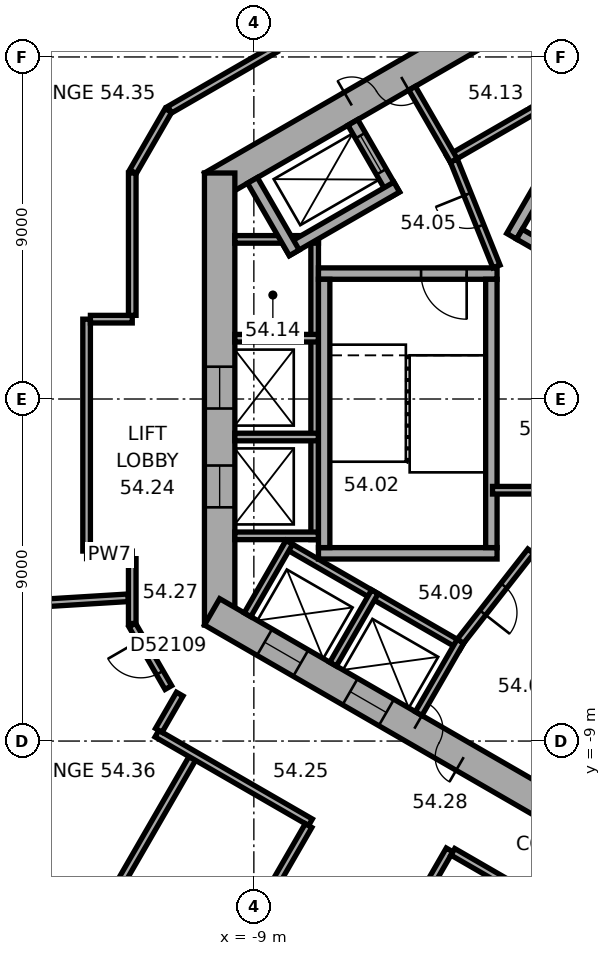
"""IFC4 building model, lengths in metres.
Left out: names, types, materials, properties, quantities, classifications, styles, units other than length and angle.
Written with IfcOpenShell. Run it as: python <this file> out.ifc"""

import sys

from ifc_helpers import new_model, si_unit, direction, frame, frame_2d, origin, place, context, subcontext, project, spatial, rectangle, extrude, element, fill, save


model = new_model("IFC4")
c1 = context("Model", 3, precision=1e-05, world=origin(), true_north=direction((0.0, 1.0)))
c2 = subcontext(c1, "Body", "Model", "MODEL_VIEW")
j1 = project(units=[si_unit("LENGTHUNIT", "METRE"), si_unit("PLANEANGLEUNIT", "RADIAN")], contexts=[c1])
p1 = place(None, origin())
s1 = spatial("IfcSite", under=j1, at=p1, CompositionType="ELEMENT")
p2 = place(p1, origin())
s2 = spatial("IfcBuilding", under=s1, at=p2, CompositionType="ELEMENT")
p3 = place(p2, frame((0.0, 0.0, 221.7)))
s3 = spatial("IfcBuildingStorey", under=s2, at=p3, CompositionType="ELEMENT", Elevation=221.7)
p4 = place(p3, frame((0.2, 11.547, 0.0), z_axis=(0.0, 0.0, 1.0), x_axis=(-0.866023897231, -0.500002609418, 0.0)))
e1 = element("IfcWall", 1, at=p4, inside=s3, PredefinedType="SHEAR", context=c2, shape_type="SweptSolid", body=[
    extrude(rectangle(XDim=11.894, YDim=0.8, at=frame_2d((5.947, 0.0))), origin(), (0.0, 0.0, 1.0), 3.7),
])
p5 = place(p4, frame((6.147, 0.0, 0.0)))
e2 = element("IfcOpeningElement", 2, at=p5, cuts=e1, PredefinedType="OPENING", context=c2, shape_type="SweptSolid", body=[
    extrude(rectangle(XDim=1.5, YDim=2.1, at=frame_2d((0.75, 1.05))), frame((0.0, 0.41, 0.0), z_axis=(0.0, -1.0, 0.0), x_axis=(1.0, 0.0, 0.0)), (0.0, 0.0, 1.0), 0.82),
])
p6 = place(p4, frame((2.997, 0.0, 0.0)))
e3 = element("IfcOpeningElement", 3, at=p6, cuts=e1, PredefinedType="OPENING", context=c2, shape_type="SweptSolid", body=[
    extrude(rectangle(XDim=0.9, YDim=2.1, at=frame_2d((0.45, 1.05))), frame((0.0, 0.41, 0.0), z_axis=(0.0, -1.0, 0.0), x_axis=(1.0, 0.0, 0.0)), (0.0, 0.0, 1.0), 0.82),
])
p7 = place(p3, frame((-9.9, 5.947, 0.0), z_axis=(0.0, 0.0, 1.0), x_axis=(0.0, -1.0, 0.0)))
e4 = element("IfcWall", 4, at=p7, inside=s3, PredefinedType="SHEAR", context=c2, shape_type="SweptSolid", body=[
    extrude(rectangle(XDim=11.894, YDim=0.8, at=frame_2d((5.947, 0.0))), origin(), (0.0, 0.0, 1.0), 3.7),
])
p8 = place(p7, frame((5.097, 0.0, 0.0)))
e5 = element("IfcOpeningElement", 5, at=p8, cuts=e4, PredefinedType="OPENING", context=c2, shape_type="SweptSolid", body=[
    extrude(rectangle(XDim=1.1, YDim=2.1, at=frame_2d((0.55, 1.05))), frame((0.0, 0.41, 0.0), z_axis=(0.0, -1.0, 0.0), x_axis=(1.0, 0.0, 0.0)), (0.0, 0.0, 1.0), 0.82),
])
p9 = place(p7, frame((7.697, 0.0, 0.0)))
e6 = element("IfcOpeningElement", 6, at=p9, cuts=e4, PredefinedType="OPENING", context=c2, shape_type="SweptSolid", body=[
    extrude(rectangle(XDim=1.1, YDim=2.1, at=frame_2d((0.55, 1.05))), frame((0.0, 0.41, 0.0), z_axis=(0.0, -1.0, 0.0), x_axis=(1.0, 0.0, 0.0)), (0.0, 0.0, 1.0), 0.82),
])
p10 = place(p3, frame((-10.1, -5.6, 0.0), z_axis=(0.0, 0.0, 1.0), x_axis=(0.866023897231, -0.500002609418, 0.0)))
e7 = element("IfcWall", 7, at=p10, inside=s3, PredefinedType="SHEAR", context=c2, shape_type="SweptSolid", body=[
    extrude(rectangle(XDim=11.894, YDim=0.8, at=frame_2d((5.947, 0.0))), origin(), (0.0, 0.0, 1.0), 3.7),
])
p11 = place(p10, frame((6.147, 0.0, 0.0)))
e8 = element("IfcOpeningElement", 8, at=p11, cuts=e7, PredefinedType="OPENING", context=c2, shape_type="SweptSolid", body=[
    extrude(rectangle(XDim=1.5, YDim=2.1, at=frame_2d((0.75, 1.05))), frame((0.0, 0.41, 0.0), z_axis=(0.0, -1.0, 0.0), x_axis=(1.0, 0.0, 0.0)), (0.0, 0.0, 1.0), 0.82),
])
p12 = place(p10, frame((1.597, 0.0, 0.0)))
e9 = element("IfcOpeningElement", 9, at=p12, cuts=e7, PredefinedType="OPENING", context=c2, shape_type="SweptSolid", body=[
    extrude(rectangle(XDim=1.1, YDim=2.1, at=frame_2d((0.55, 1.05))), frame((0.0, 0.41, 0.0), z_axis=(0.0, -1.0, 0.0), x_axis=(1.0, 0.0, 0.0)), (0.0, 0.0, 1.0), 0.82),
])
p13 = place(p10, frame((4.197, 0.0, 0.0)))
e10 = element("IfcOpeningElement", 10, at=p13, cuts=e7, PredefinedType="OPENING", context=c2, shape_type="SweptSolid", body=[
    extrude(rectangle(XDim=1.1, YDim=2.1, at=frame_2d((0.55, 1.05))), frame((0.0, 0.41, 0.0), z_axis=(0.0, -1.0, 0.0), x_axis=(1.0, 0.0, 0.0)), (0.0, 0.0, 1.0), 0.82),
])
p14 = place(p3, frame((0.803, 9.009, 0.0), z_axis=(0.0, 0.0, 1.0), x_axis=(-0.866028230842, -0.499995103361, 0.0)))
e11 = element("IfcWall", 11, at=p14, inside=s3, PredefinedType="PARTITIONING", context=c2, shape_type="SweptSolid", body=[
    extrude(rectangle(XDim=5.4, YDim=0.2, at=frame_2d((2.7, 0.0))), origin(), (0.0, 0.0, 1.0), 3.42),
])
p15 = place(p3, frame((-3.737, 6.272, 0.0), z_axis=(0.0, 0.0, 1.0), x_axis=(-0.50002983664, 0.866008176907, 0.0)))
e12 = element("IfcWall", 12, at=p15, inside=s3, PredefinedType="PARTITIONING", context=c2, shape_type="SweptSolid", body=[
    extrude(rectangle(XDim=2.2, YDim=0.2, at=frame_2d((1.1, 0.0))), origin(), (0.0, 0.0, 1.0), 3.42),
])
p16 = place(p3, frame((-7.4, 4.3, 0.0), z_axis=(0.0, 0.0, 1.0), x_axis=(0.0, -1.0, 0.0)))
e13 = element("IfcWall", 13, at=p16, inside=s3, PredefinedType="PARTITIONING", context=c2, shape_type="SweptSolid", body=[
    extrude(rectangle(XDim=8.0, YDim=0.2, at=frame_2d((4.0, 0.0))), origin(), (0.0, 0.0, 1.0), 3.42),
])
for number, where, z_axis, x_axis in (
    (14, (-7.3, 4.2, 0.0), (0.0, 0.0, 1.0), (-1.0, 0.0, 0.0)),
    (15, (-7.3, 1.6, 0.0), (0.0, 0.0, 1.0), (-1.0, 0.0, 0.0)),
    (16, (-7.3, -1.0, 0.0), (0.0, 0.0, 1.0), (-1.0, 0.0, 0.0)),
    (17, (-7.3, -3.6, 0.0), (0.0, 0.0, 1.0), (-1.0, 0.0, 0.0)),
):
    element("IfcWall", number, at=place(p3, frame(where, z_axis=z_axis, x_axis=x_axis)), inside=s3, PredefinedType="PARTITIONING", context=c2, shape_type="SweptSolid", body=[
        extrude(rectangle(XDim=2.2, YDim=0.2, at=frame_2d((1.1, 0.0))), origin(), (0.0, 0.0, 1.0), 3.42),
    ])
p17 = place(p3, frame((-8.203, -3.809, 0.0), z_axis=(0.0, 0.0, 1.0), x_axis=(0.866028230842, -0.499995103361, 0.0)))
e18 = element("IfcWall", 18, at=p17, inside=s3, PredefinedType="PARTITIONING", context=c2, shape_type="SweptSolid", body=[
    extrude(rectangle(XDim=5.4, YDim=0.2, at=frame_2d((2.7, 0.0))), origin(), (0.0, 0.0, 1.0), 3.42),
])
for number, where, z_axis, x_axis in (
    (19, (-8.067, -3.772, 0.0), (0.0, 0.0, 1.0), (-0.5, -0.866, 0.0)),
    (20, (-5.815, -5.072, 0.0), (0.0, 0.0, 1.0), (-0.5, -0.866, 0.0)),
):
    element("IfcWall", number, at=place(p3, frame(where, z_axis=z_axis, x_axis=x_axis)), inside=s3, PredefinedType="PARTITIONING", context=c2, shape_type="SweptSolid", body=[
        extrude(rectangle(XDim=2.2, YDim=0.2, at=frame_2d((1.1, 0.0))), origin(), (0.0, 0.0, 1.0), 3.42),
    ])
p18 = place(p3, frame((-3.563, -6.372, 0.0), z_axis=(0.0, 0.0, 1.0), x_axis=(-0.499994660107, -0.866028486751, 0.0)))
e21 = element("IfcWall", 21, at=p18, inside=s3, PredefinedType="PARTITIONING", context=c2, shape_type="SweptSolid", body=[
    extrude(rectangle(XDim=2.2, YDim=0.2, at=frame_2d((1.1, 0.0))), origin(), (0.0, 0.0, 1.0), 3.42),
])
p19 = place(p3, frame((-2.216, 4.282, 0.0), z_axis=(0.0, 0.0, 1.0), x_axis=(0.499977259774, 0.866038532462, 0.0)))
e22 = element("IfcWall", 22, at=p19, inside=s3, PredefinedType="SHEAR", context=c2, shape_type="SweptSolid", body=[
    extrude(rectangle(XDim=4.7, YDim=0.3, at=frame_2d((2.35, 0.0))), origin(), (0.0, 0.0, 1.0), 3.42),
])
p20 = place(p3, frame((4.103, 0.807, 0.0), z_axis=(0.0, 0.0, 1.0), x_axis=(-0.866027801685, 0.499995846692, 0.0)))
e23 = element("IfcWall", 23, at=p20, inside=s3, PredefinedType="SHEAR", context=c2, shape_type="SweptSolid", body=[
    extrude(rectangle(XDim=7.06, YDim=0.3, at=frame_2d((3.53, 0.0))), origin(), (0.0, 0.0, 1.0), 3.42),
])
p21 = place(p3, frame((-2.6, 3.3, 0.0), z_axis=(0.0, 0.0, 1.0), x_axis=(-1.0, 0.0, 0.0)))
e24 = element("IfcWall", 24, at=p21, inside=s3, PredefinedType="SHEAR", context=c2, shape_type="SweptSolid", body=[
    extrude(rectangle(XDim=4.7, YDim=0.3, at=frame_2d((2.35, 0.0))), origin(), (0.0, 0.0, 1.0), 3.42),
])
p22 = place(p21, frame((0.8, 0.0, 0.0)))
e25 = element("IfcOpeningElement", 25, at=p22, cuts=e24, PredefinedType="OPENING", context=c2, shape_type="SweptSolid", body=[
    extrude(rectangle(XDim=1.2, YDim=2.1, at=frame_2d((0.6, 1.05))), frame((0.0, 0.16, 0.0), z_axis=(0.0, -1.0, 0.0), x_axis=(1.0, 0.0, 0.0)), (0.0, 0.0, 1.0), 0.32),
])
p23 = place(p3, frame((-2.6, -4.06, 0.0), z_axis=(0.0, 0.0, 1.0), x_axis=(-1.0, 0.0, 0.0)))
e26 = element("IfcWall", 26, at=p23, inside=s3, PredefinedType="SHEAR", context=c2, shape_type="SweptSolid", body=[
    extrude(rectangle(XDim=4.7, YDim=0.3, at=frame_2d((2.35, 0.0))), origin(), (0.0, 0.0, 1.0), 3.42),
])
for number, where, z_axis, x_axis in (
    (27, (-2.75, 3.15, 0.0), (0.0, 0.0, 1.0), (0.0, -1.0, 0.0)),
    (28, (-7.15, 3.15, 0.0), (0.0, 0.0, 1.0), (0.0, -1.0, 0.0)),
):
    element("IfcWall", number, at=place(p3, frame(where, z_axis=z_axis, x_axis=x_axis)), inside=s3, PredefinedType="SHEAR", context=c2, shape_type="SweptSolid", body=[
        extrude(rectangle(XDim=7.06, YDim=0.3, at=frame_2d((3.53, 0.0))), origin(), (0.0, 0.0, 1.0), 3.42),
    ])
p24 = place(p3, frame((-5.295, 5.372, 0.0), z_axis=(0.0, 0.0, 1.0), x_axis=(-0.500077893725, 0.86598042715, 0.0)))
e29 = element("IfcWall", 29, at=p24, inside=s3, PredefinedType="SHEAR", context=c2, shape_type="SweptSolid", body=[
    extrude(rectangle(XDim=2.2, YDim=0.3, at=frame_2d((1.1, 0.0))), origin(), (0.0, 0.0, 1.0), 3.42),
])
p25 = place(p24, frame((0.7, 0.0, 0.0)))
e30 = element("IfcOpeningElement", 30, at=p25, cuts=e29, PredefinedType="OPENING", context=c2, shape_type="SweptSolid", body=[
    extrude(rectangle(XDim=1.1, YDim=2.1, at=frame_2d((0.55, 1.05))), frame((0.0, 0.16, 0.0), z_axis=(0.0, -1.0, 0.0), x_axis=(1.0, 0.0, 0.0)), (0.0, 0.0, 1.0), 0.32),
])
p26 = place(p3, frame((-5.24, 5.577, 0.0), z_axis=(0.0, 0.0, 1.0), x_axis=(-0.866014461049, -0.500018952895, 0.0)))
e31 = element("IfcWall", 31, at=p26, inside=s3, PredefinedType="SHEAR", context=c2, shape_type="SweptSolid", body=[
    extrude(rectangle(XDim=3.35, YDim=0.3, at=frame_2d((1.675, 0.0))), origin(), (0.0, 0.0, 1.0), 3.42),
])
p27 = place(p3, frame((-7.937, 3.847, 0.0), z_axis=(0.0, 0.0, 1.0), x_axis=(-0.50002983664, 0.866008176907, 0.0)))
e32 = element("IfcWall", 32, at=p27, inside=s3, PredefinedType="SHEAR", context=c2, shape_type="SweptSolid", body=[
    extrude(rectangle(XDim=2.2, YDim=0.3, at=frame_2d((1.1, 0.0))), origin(), (0.0, 0.0, 1.0), 3.42),
])
p28 = place(p3, frame((-2.615, 3.487, 0.0), z_axis=(0.0, 0.0, 1.0), x_axis=(-0.373576831041, 0.92759924068, 0.0)))
e33 = element("IfcWall", 33, at=p28, inside=s3, PredefinedType="PARTITIONING", context=c2, shape_type="SweptSolid", body=[
    extrude(rectangle(XDim=3.002, YDim=0.2, at=frame_2d((1.501, 0.0))), origin(), (0.0, 0.0, 1.0), 3.42),
])
p29 = place(p28, frame((1.15, 0.0, 0.0)))
e34 = element("IfcOpeningElement", 34, at=p29, cuts=e33, PredefinedType="OPENING", context=c2, shape_type="SweptSolid", body=[
    extrude(rectangle(XDim=0.9, YDim=2.1, at=frame_2d((0.45, 1.05))), frame((0.0, 0.11, 0.0), z_axis=(0.0, -1.0, 0.0), x_axis=(1.0, 0.0, 0.0)), (0.0, 0.0, 1.0), 0.22),
])
p30 = place(p3, frame((-1.712, -4.008, 0.0), z_axis=(0.0, 0.0, 1.0), x_axis=(-0.616549420702, -0.787316208287, 0.0)))
e35 = element("IfcWall", 35, at=p30, inside=s3, PredefinedType="PARTITIONING", context=c2, shape_type="SweptSolid", body=[
    extrude(rectangle(XDim=3.002, YDim=0.2, at=frame_2d((1.501, 0.0))), origin(), (0.0, 0.0, 1.0), 3.42),
])
p31 = place(p30, frame((1.15, 0.0, 0.0)))
e36 = element("IfcOpeningElement", 36, at=p31, cuts=e35, PredefinedType="OPENING", context=c2, shape_type="SweptSolid", body=[
    extrude(rectangle(XDim=0.9, YDim=2.1, at=frame_2d((0.45, 1.05))), frame((0.0, 0.11, 0.0), z_axis=(0.0, -1.0, 0.0), x_axis=(1.0, 0.0, 0.0)), (0.0, 0.0, 1.0), 0.22),
])
p32 = place(p3, frame((-2.72, -2.4, 0.0), z_axis=(0.0, 0.0, 1.0), x_axis=(1.0, 0.0, 0.0)))
e37 = element("IfcWall", 37, at=p32, inside=s3, PredefinedType="PARTITIONING", context=c2, shape_type="SweptSolid", body=[
    extrude(rectangle(XDim=3.883, YDim=0.2, at=frame_2d((1.941, 0.0))), origin(), (0.0, 0.0, 1.0), 3.42),
])
p33 = place(p3, frame((-19.241, -5.654, 0.0), z_axis=(0.0, 0.0, 1.0), x_axis=(0.998135538818, 0.061036432963, 0.0)))
e38 = element("IfcWall", 38, at=p33, inside=s3, PredefinedType="PARTITIONING", context=c2, shape_type="SweptSolid", body=[
    extrude(rectangle(XDim=6.944, YDim=0.2, at=frame_2d((3.472, 0.0))), origin(), (0.0, 0.0, 1.0), 2.87),
])
p34 = place(p3, frame((-13.646, -14.696, 0.0), z_axis=(0.0, 0.0, 1.0), x_axis=(0.500006596359, 0.866021595341, 0.0)))
e39 = element("IfcWall", 39, at=p34, inside=s3, PredefinedType="PARTITIONING", context=c2, shape_type="SweptSolid", body=[
    extrude(rectangle(XDim=6.049, YDim=0.2, at=frame_2d((3.025, 0.0))), origin(), (0.0, 0.0, 1.0), 3.42),
])
p35 = place(p3, frame((-13.401, -4.101, 0.0), z_axis=(0.0, 0.0, 1.0), x_axis=(1.0, 0.0, 0.0)))
e40 = element("IfcWall", 40, at=p35, inside=s3, PredefinedType="PARTITIONING", context=c2, shape_type="SweptSolid", body=[
    extrude(rectangle(XDim=1.201, YDim=0.2, at=frame_2d((0.601, 0.0))), origin(), (0.0, 0.0, 1.0), 3.42),
])
p36 = place(p3, frame((-13.401, 2.101, 0.0), z_axis=(0.0, 0.0, 1.0), x_axis=(0.0, -1.0, 0.0)))
e41 = element("IfcWall", 41, at=p36, inside=s3, PredefinedType="PARTITIONING", context=c2, shape_type="SweptSolid", body=[
    extrude(rectangle(XDim=6.102, YDim=0.2, at=frame_2d((3.051, 0.0))), origin(), (0.0, 0.0, 1.0), 3.42),
])
p37 = place(p3, frame((-12.2, -5.947, 0.0), z_axis=(0.0, 0.0, 1.0), x_axis=(0.500022797313, -0.86601224135, 0.0)))
e42 = element("IfcWall", 42, at=p37, inside=s3, PredefinedType="PARTITIONING", context=c2, shape_type="SweptSolid", body=[
    extrude(rectangle(XDim=1.9, YDim=0.2, at=frame_2d((0.95, 0.0))), origin(), (0.0, 0.0, 1.0), 3.42),
])
p38 = place(p37, frame((0.45, 0.0, 0.0)))
e43 = element("IfcOpeningElement", 43, at=p38, cuts=e42, PredefinedType="OPENING", context=c2, shape_type="SweptSolid", body=[
    extrude(rectangle(XDim=1.0, YDim=2.1, at=frame_2d((0.5, 1.05))), frame((0.0, 0.11, 0.0), z_axis=(0.0, -1.0, 0.0), x_axis=(1.0, 0.0, 0.0)), (0.0, 0.0, 1.0), 0.22),
])
p39 = place(p3, frame((-12.2, -4.201, 0.0), z_axis=(0.0, 0.0, 1.0), x_axis=(0.0, -1.0, 0.0)))
e44 = element("IfcWall", 44, at=p39, inside=s3, PredefinedType="PARTITIONING", context=c2, shape_type="SweptSolid", body=[
    extrude(rectangle(XDim=1.706, YDim=0.2, at=frame_2d((0.853, 0.0))), origin(), (0.0, 0.0, 1.0), 3.42),
])
p40 = place(p3, frame((-12.2, 2.101, 0.0), z_axis=(0.0, 0.0, 1.0), x_axis=(-1.0, 0.0, 0.0)))
e45 = element("IfcWall", 45, at=p40, inside=s3, PredefinedType="PARTITIONING", context=c2, shape_type="SweptSolid", body=[
    extrude(rectangle(XDim=1.101, YDim=0.2, at=frame_2d((0.551, 0.0))), origin(), (0.0, 0.0, 1.0), 3.42),
])
p41 = place(p3, frame((-12.2, 5.947, 0.0), z_axis=(0.0, 0.0, 1.0), x_axis=(0.0, -1.0, 0.0)))
e46 = element("IfcWall", 46, at=p41, inside=s3, PredefinedType="PARTITIONING", context=c2, shape_type="SweptSolid", body=[
    extrude(rectangle(XDim=3.746, YDim=0.2, at=frame_2d((1.873, 0.0))), origin(), (0.0, 0.0, 1.0), 3.42),
])
p42 = place(p3, frame((-11.551, -8.805, 0.0), z_axis=(0.0, 0.0, 1.0), x_axis=(0.866038310922, -0.499977643516, 0.0)))
e47 = element("IfcWall", 47, at=p42, inside=s3, PredefinedType="PARTITIONING", context=c2, shape_type="SweptSolid", body=[
    extrude(rectangle(XDim=4.665, YDim=0.2, at=frame_2d((2.333, 0.0))), origin(), (0.0, 0.0, 1.0), 3.42),
])
p43 = place(p3, frame((-11.25, 7.592, 0.0), z_axis=(0.0, 0.0, 1.0), x_axis=(-0.499964847546, -0.866045698112, 0.0)))
e48 = element("IfcWall", 48, at=p43, inside=s3, PredefinedType="PARTITIONING", context=c2, shape_type="SweptSolid", body=[
    extrude(rectangle(XDim=1.86, YDim=0.2, at=frame_2d((0.93, 0.0))), origin(), (0.0, 0.0, 1.0), 3.42),
])
p44 = place(p3, frame((-10.951, -7.765, 0.0), z_axis=(0.0, 0.0, 1.0), x_axis=(-0.499978356969, -0.866037899034, 0.0)))
e49 = element("IfcWall", 49, at=p44, inside=s3, PredefinedType="PARTITIONING", context=c2, shape_type="SweptSolid", body=[
    extrude(rectangle(XDim=1.101, YDim=0.2, at=frame_2d((0.551, 0.0))), origin(), (0.0, 0.0, 1.0), 3.42),
])
p45 = place(p3, frame((-10.585, -16.463, 0.0), z_axis=(0.0, 0.0, 1.0), x_axis=(0.499993802756, 0.866028981735, 0.0)))
e50 = element("IfcWall", 50, at=p45, inside=s3, PredefinedType="PARTITIONING", context=c2, shape_type="SweptSolid", body=[
    extrude(rectangle(XDim=6.049, YDim=0.2, at=frame_2d((3.024, 0.0))), origin(), (0.0, 0.0, 1.0), 2.87),
])
p46 = place(p45, frame((2.524, 0.0, 0.0)))
e51 = element("IfcOpeningElement", 51, at=p46, cuts=e50, PredefinedType="OPENING", context=c2, shape_type="SweptSolid", body=[
    extrude(rectangle(XDim=1.0, YDim=2.1, at=frame_2d((0.5, 1.05))), frame((0.0, 0.11, 0.0), z_axis=(0.0, -1.0, 0.0), x_axis=(1.0, 0.0, 0.0)), (0.0, 0.0, 1.0), 0.22),
])
p47 = place(p3, frame((-8.437, 9.217, 0.0), z_axis=(0.0, 0.0, 1.0), x_axis=(-0.866005660673, -0.500034194513, 0.0)))
e52 = element("IfcWall", 52, at=p47, inside=s3, PredefinedType="PARTITIONING", context=c2, shape_type="SweptSolid", body=[
    extrude(rectangle(XDim=3.209, YDim=0.2, at=frame_2d((1.604, 0.0))), origin(), (0.0, 0.0, 1.0), 3.42),
])
p48 = place(p3, frame((-7.525, -18.23, 0.0), z_axis=(0.0, 0.0, 1.0), x_axis=(0.499983153418, 0.866035129944, 0.0)))
e53 = element("IfcWall", 53, at=p48, inside=s3, PredefinedType="PARTITIONING", context=c2, shape_type="SweptSolid", body=[
    extrude(rectangle(XDim=7.35, YDim=0.2, at=frame_2d((3.675, 0.0))), origin(), (0.0, 0.0, 1.0), 3.42),
])
p49 = place(p48, frame((3.175, 0.0, 0.0)))
e54 = element("IfcOpeningElement", 54, at=p49, cuts=e53, PredefinedType="OPENING", context=c2, shape_type="SweptSolid", body=[
    extrude(rectangle(XDim=1.0, YDim=2.1, at=frame_2d((0.5, 1.05))), frame((0.0, 0.11, 0.0), z_axis=(0.0, -1.0, 0.0), x_axis=(1.0, 0.0, 0.0)), (0.0, 0.0, 1.0), 0.22),
])
p50 = place(p3, frame((-3.763, -11.915, 0.0), z_axis=(0.0, 0.0, 1.0), x_axis=(0.866037915695, -0.499978328108, 0.0)))
e55 = element("IfcWall", 55, at=p50, inside=s3, PredefinedType="PARTITIONING", context=c2, shape_type="SweptSolid", body=[
    extrude(rectangle(XDim=3.249, YDim=0.2, at=frame_2d((1.625, 0.0))), origin(), (0.0, 0.0, 1.0), 3.42),
])
p51 = place(p5, origin())
e56 = element("IfcDoor", 56, at=p51, inside=s3, OperationType="DOUBLE_DOOR_SINGLE_SWING", PredefinedType="DOOR", context=c2, shape_type="SweptSolid", body=[
    extrude(rectangle(XDim=1.5, YDim=2.1, at=frame_2d((0.75, 1.05))), frame((0.0, 0.025, 0.0), z_axis=(0.0, -1.0, 0.0), x_axis=(1.0, 0.0, 0.0)), (0.0, 0.0, 1.0), 0.05),
])
fill(e2, e56)
p52 = place(p11, origin())
e57 = element("IfcDoor", 57, at=p52, inside=s3, OperationType="DOUBLE_DOOR_SINGLE_SWING", PredefinedType="DOOR", context=c2, shape_type="SweptSolid", body=[
    extrude(rectangle(XDim=1.5, YDim=2.1, at=frame_2d((0.75, 1.05))), frame((0.0, 0.025, 0.0), z_axis=(0.0, -1.0, 0.0), x_axis=(1.0, 0.0, 0.0)), (0.0, 0.0, 1.0), 0.05),
])
fill(e8, e57)
p53 = place(p22, origin())
e58 = element("IfcDoor", 58, at=p53, inside=s3, OperationType="SINGLE_SWING_RIGHT", PredefinedType="DOOR", context=c2, shape_type="SweptSolid", body=[
    extrude(rectangle(XDim=1.2, YDim=2.1, at=frame_2d((0.6, 1.05))), frame((0.0, 0.025, 0.0), z_axis=(0.0, -1.0, 0.0), x_axis=(1.0, 0.0, 0.0)), (0.0, 0.0, 1.0), 0.05),
])
fill(e25, e58)
p54 = place(p29, origin())
e59 = element("IfcDoor", 59, at=p54, inside=s3, OperationType="SINGLE_SWING_LEFT", PredefinedType="DOOR", context=c2, shape_type="SweptSolid", body=[
    extrude(rectangle(XDim=0.9, YDim=2.1, at=frame_2d((0.45, 1.05))), frame((0.0, 0.025, 0.0), z_axis=(0.0, -1.0, 0.0), x_axis=(1.0, 0.0, 0.0)), (0.0, 0.0, 1.0), 0.05),
])
fill(e34, e59)
p55 = place(p31, origin())
e60 = element("IfcDoor", 60, at=p55, inside=s3, OperationType="SINGLE_SWING_LEFT", PredefinedType="DOOR", context=c2, shape_type="SweptSolid", body=[
    extrude(rectangle(XDim=0.9, YDim=2.1, at=frame_2d((0.45, 1.05))), frame((0.0, 0.025, 0.0), z_axis=(0.0, -1.0, 0.0), x_axis=(1.0, 0.0, 0.0)), (0.0, 0.0, 1.0), 0.05),
])
fill(e36, e60)
p56 = place(p25, origin())
e61 = element("IfcDoor", 61, at=p56, inside=s3, OperationType="DOUBLE_DOOR_SLIDING", PredefinedType="DOOR", context=c2, shape_type="SweptSolid", body=[
    extrude(rectangle(XDim=1.1, YDim=2.1, at=frame_2d((0.55, 1.05))), frame((0.0, 0.025, 0.0), z_axis=(0.0, -1.0, 0.0), x_axis=(1.0, 0.0, 0.0)), (0.0, 0.0, 1.0), 0.05),
])
fill(e30, e61)
p57 = place(p8, origin())
e62 = element("IfcDoor", 62, at=p57, inside=s3, OperationType="DOUBLE_DOOR_SLIDING", PredefinedType="DOOR", context=c2, shape_type="SweptSolid", body=[
    extrude(rectangle(XDim=1.1, YDim=2.1, at=frame_2d((0.55, 1.05))), frame((0.0, 0.025, 0.0), z_axis=(0.0, -1.0, 0.0), x_axis=(1.0, 0.0, 0.0)), (0.0, 0.0, 1.0), 0.05),
])
fill(e5, e62)
p58 = place(p9, origin())
e63 = element("IfcDoor", 63, at=p58, inside=s3, OperationType="DOUBLE_DOOR_SLIDING", PredefinedType="DOOR", context=c2, shape_type="SweptSolid", body=[
    extrude(rectangle(XDim=1.1, YDim=2.1, at=frame_2d((0.55, 1.05))), frame((0.0, 0.025, 0.0), z_axis=(0.0, -1.0, 0.0), x_axis=(1.0, 0.0, 0.0)), (0.0, 0.0, 1.0), 0.05),
])
fill(e6, e63)
p59 = place(p12, origin())
e64 = element("IfcDoor", 64, at=p59, inside=s3, OperationType="DOUBLE_DOOR_SLIDING", PredefinedType="DOOR", context=c2, shape_type="SweptSolid", body=[
    extrude(rectangle(XDim=1.1, YDim=2.1, at=frame_2d((0.55, 1.05))), frame((0.0, 0.025, 0.0), z_axis=(0.0, -1.0, 0.0), x_axis=(1.0, 0.0, 0.0)), (0.0, 0.0, 1.0), 0.05),
])
fill(e9, e64)
p60 = place(p13, origin())
e65 = element("IfcDoor", 65, at=p60, inside=s3, OperationType="DOUBLE_DOOR_SLIDING", PredefinedType="DOOR", context=c2, shape_type="SweptSolid", body=[
    extrude(rectangle(XDim=1.1, YDim=2.1, at=frame_2d((0.55, 1.05))), frame((0.0, 0.025, 0.0), z_axis=(0.0, -1.0, 0.0), x_axis=(1.0, 0.0, 0.0)), (0.0, 0.0, 1.0), 0.05),
])
fill(e10, e65)
p61 = place(p38, origin())
e66 = element("IfcDoor", 66, at=p61, inside=s3, OperationType="SINGLE_SWING_LEFT", PredefinedType="DOOR", context=c2, shape_type="SweptSolid", body=[
    extrude(rectangle(XDim=1.0, YDim=2.1, at=frame_2d((0.5, 1.05))), frame((0.0, 0.025, 0.0), z_axis=(0.0, -1.0, 0.0), x_axis=(1.0, 0.0, 0.0)), (0.0, 0.0, 1.0), 0.05),
])
fill(e43, e66)
save(model, sys.argv[1])
